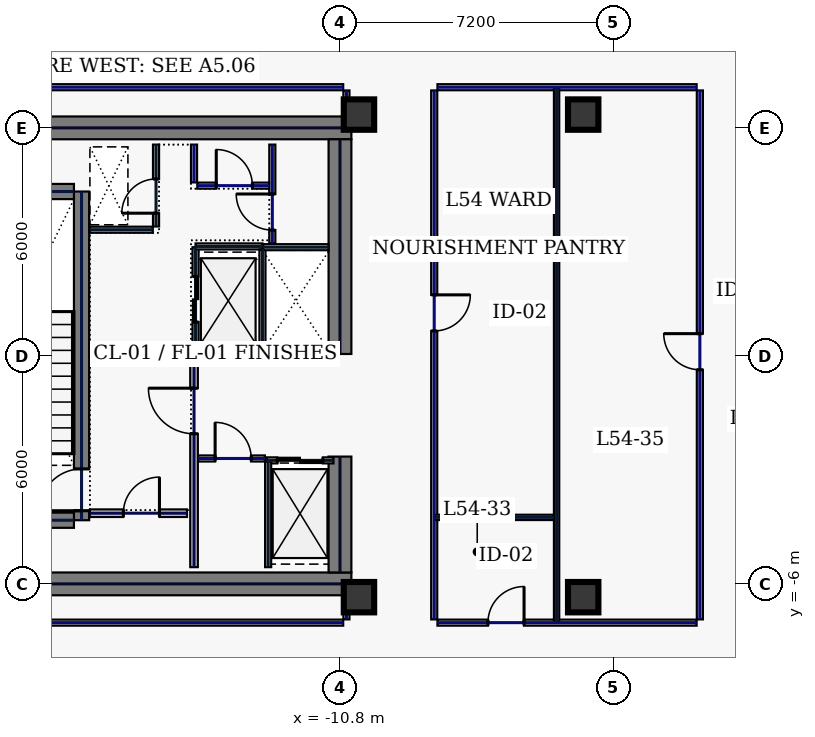
"""IFC4 building model, lengths in metres.
Left out: names, types, materials, properties, quantities, classifications, styles, units other than length and angle.
Written with IfcOpenShell. Run it as: python <this file> out.ifc"""

import sys

from ifc_helpers import new_model, si_unit, direction, frame, frame_2d, origin, origin_2d, place, context, subcontext, project, spatial, rectangle, hollow_rectangle, extrude, element, fill, save


model = new_model("IFC4")
c1 = context("Model", 3, precision=1e-05, world=origin(), true_north=direction((0.0, 1.0)))
c2 = subcontext(c1, "Body", "Model", "MODEL_VIEW")
j1 = project(units=[si_unit("LENGTHUNIT", "METRE"), si_unit("PLANEANGLEUNIT", "RADIAN")], contexts=[c1])
p1 = place(None, origin())
s1 = spatial("IfcSite", under=j1, at=p1, CompositionType="ELEMENT")
p2 = place(p1, origin())
s2 = spatial("IfcBuilding", under=s1, at=p2, CompositionType="ELEMENT")
p3 = place(p2, frame((0.0, 0.0, 234.2)))
s3 = spatial("IfcBuildingStorey", under=s2, at=p3, CompositionType="ELEMENT", Elevation=234.2)
for number, where, z_axis, x_axis in (
    (1, (-22.0, 6.0, 0.0), (0.0, 0.0, 1.0), (1.0, 0.0, 0.0)),
    (2, (-22.0, -6.0, 0.0), (0.0, 0.0, 1.0), (1.0, 0.0, 0.0)),
):
    element("IfcWall", number, at=place(p3, frame(where, z_axis=z_axis, x_axis=x_axis)), inside=s3, PredefinedType="SHEAR", context=c2, shape_type="SweptSolid", body=[
        extrude(rectangle(XDim=11.5, YDim=0.6, at=frame_2d((5.75, 0.0))), origin(), (0.0, 0.0, 1.0), 3.74),
    ])
p4 = place(p3, frame((-10.8, -5.7, 0.0), z_axis=(0.0, 0.0, 1.0), x_axis=(0.0, 1.0, 0.0)))
e3 = element("IfcWall", 3, at=p4, inside=s3, PredefinedType="SHEAR", context=c2, shape_type="SweptSolid", body=[
    extrude(rectangle(XDim=3.05, YDim=0.6, at=frame_2d((1.525, 0.0))), origin(), (0.0, 0.0, 1.0), 3.74),
])
p5 = place(p3, frame((-10.8, 0.05, 0.0), z_axis=(0.0, 0.0, 1.0), x_axis=(0.0, 1.0, 0.0)))
e4 = element("IfcWall", 4, at=p5, inside=s3, PredefinedType="SHEAR", context=c2, shape_type="SweptSolid", body=[
    extrude(rectangle(XDim=5.65, YDim=0.6, at=frame_2d((2.825, 0.0))), origin(), (0.0, 0.0, 1.0), 3.74),
])
p6 = place(p3, frame((-17.6, -4.325, 0.0), z_axis=(0.0, 0.0, 1.0), x_axis=(0.0, 1.0, 0.0)))
e5 = element("IfcWall", 5, at=p6, inside=s3, PredefinedType="SHEAR", context=c2, shape_type="SweptSolid", body=[
    extrude(rectangle(XDim=8.65, YDim=0.4, at=frame_2d((4.325, 0.0))), origin(), (0.0, 0.0, 1.0), 3.74),
])
p7 = place(p6, frame((0.25, 0.0, 0.0)))
e6 = element("IfcOpeningElement", 6, at=p7, cuts=e5, PredefinedType="OPENING", context=c2, shape_type="SweptSolid", body=[
    extrude(rectangle(XDim=1.1, YDim=2.2, at=frame_2d((0.55, 1.1))), frame((0.0, 0.21, 0.0), z_axis=(0.0, -1.0, 0.0), x_axis=(1.0, 0.0, 0.0)), (0.0, 0.0, 1.0), 0.42),
])
for number, where, z_axis, x_axis in (
    (7, (-21.2, -4.325, 0.0), (0.0, 0.0, 1.0), (1.0, 0.0, 0.0)),
    (8, (-21.2, 4.325, 0.0), (0.0, 0.0, 1.0), (1.0, 0.0, 0.0)),
):
    element("IfcWall", number, at=place(p3, frame(where, z_axis=z_axis, x_axis=x_axis)), inside=s3, PredefinedType="SHEAR", context=c2, shape_type="SweptSolid", body=[
        extrude(rectangle(XDim=3.4, YDim=0.4, at=frame_2d((1.7, 0.0))), origin(), (0.0, 0.0, 1.0), 3.74),
    ])
for number, where, z_axis, x_axis in (
    (9, (-10.3, -6.35, 0.0), (0.0, 0.0, 1.0), (1.0, 0.0, 0.0)),
    (10, (-10.3, 6.35, 0.0), (0.0, 0.0, 1.0), (1.0, 0.0, 0.0)),
    (11, (-4.4, -6.35, 0.0), (0.0, 0.0, 1.0), (1.0, 0.0, 0.0)),
    (12, (-4.4, 6.35, 0.0), (0.0, 0.0, 1.0), (1.0, 0.0, 0.0)),
):
    element("IfcColumn", number, at=place(p3, frame(where, z_axis=z_axis, x_axis=x_axis)), inside=s3, PredefinedType="COLUMN", context=c2, shape_type="SweptSolid", body=[
        extrude(hollow_rectangle(XDim=0.8, YDim=0.8, WallThickness=0.036, at=origin_2d()), origin(), (0.0, 0.0, 1.0), 3.74),
    ])
p8 = place(p3, frame((-14.6, 0.12, 0.0), z_axis=(0.0, 0.0, 1.0), x_axis=(0.0, 1.0, 0.0)))
e13 = element("IfcWall", 13, at=p8, inside=s3, PredefinedType="PARTITIONING", context=c2, shape_type="SweptSolid", body=[
    extrude(rectangle(XDim=2.74, YDim=0.16, at=frame_2d((1.37, 0.0))), origin(), (0.0, 0.0, 1.0), 3.74),
])
p9 = place(p8, frame((0.77, 0.0, 0.0)))
e14 = element("IfcOpeningElement", 14, at=p9, cuts=e13, PredefinedType="OPENING", context=c2, shape_type="SweptSolid", body=[
    extrude(rectangle(XDim=1.2, YDim=2.2, at=frame_2d((0.6, 1.1))), frame((0.0, 0.09, 0.0), z_axis=(0.0, -1.0, 0.0), x_axis=(1.0, 0.0, 0.0)), (0.0, 0.0, 1.0), 0.18),
])
for number, where, z_axis, x_axis in (
    (15, (-14.6, 0.1, 0.0), (0.0, 0.0, 1.0), (1.0, 0.0, 0.0)),
    (16, (-14.6, 2.88, 0.0), (0.0, 0.0, 1.0), (1.0, 0.0, 0.0)),
):
    element("IfcWall", number, at=place(p3, frame(where, z_axis=z_axis, x_axis=x_axis)), inside=s3, PredefinedType="PARTITIONING", context=c2, shape_type="SweptSolid", body=[
        extrude(rectangle(XDim=1.76, YDim=0.16, at=frame_2d((0.88, 0.0))), origin(), (0.0, 0.0, 1.0), 3.74),
    ])
p10 = place(p3, frame((-12.84, 0.18, 0.0), z_axis=(0.0, 0.0, 1.0), x_axis=(0.0, 1.0, 0.0)))
e17 = element("IfcWall", 17, at=p10, inside=s3, PredefinedType="PARTITIONING", context=c2, shape_type="SweptSolid", body=[
    extrude(rectangle(XDim=2.62, YDim=0.16, at=frame_2d((1.31, 0.0))), origin(), (0.0, 0.0, 1.0), 3.74),
])
p11 = place(p3, frame((-12.73, -2.75, 0.0), z_axis=(0.0, 0.0, 1.0), x_axis=(1.0, 0.0, 0.0)))
e18 = element("IfcWall", 18, at=p11, inside=s3, PredefinedType="PARTITIONING", context=c2, shape_type="SweptSolid", body=[
    extrude(rectangle(XDim=1.76, YDim=0.16, at=frame_2d((0.88, 0.0))), origin(), (0.0, 0.0, 1.0), 3.74),
])
p12 = place(p11, frame((0.28, 0.0, 0.0)))
e19 = element("IfcOpeningElement", 19, at=p12, cuts=e18, PredefinedType="OPENING", context=c2, shape_type="SweptSolid", body=[
    extrude(rectangle(XDim=1.2, YDim=2.2, at=frame_2d((0.6, 1.1))), frame((0.0, 0.09, 0.0), z_axis=(0.0, -1.0, 0.0), x_axis=(1.0, 0.0, 0.0)), (0.0, 0.0, 1.0), 0.18),
])
for number, where, z_axis, x_axis in (
    (20, (-12.82, 0.06, 0.0), (0.0, 0.0, 1.0), (1.0, 0.0, 0.0)),
    (21, (-12.82, 2.86, 0.0), (0.0, 0.0, 1.0), (1.0, 0.0, 0.0)),
):
    element("IfcWall", number, at=place(p3, frame(where, z_axis=z_axis, x_axis=x_axis)), inside=s3, PredefinedType="PARTITIONING", context=c2, shape_type="SweptSolid", body=[
        extrude(rectangle(XDim=1.72, YDim=0.16, at=frame_2d((0.86, 0.0))), origin(), (0.0, 0.0, 1.0), 3.74),
    ])
p13 = place(p3, frame((-15.64, 3.405, 0.0), z_axis=(0.0, 0.0, 1.0), x_axis=(0.0, 1.0, 0.0)))
e22 = element("IfcWall", 22, at=p13, inside=s3, PredefinedType="PARTITIONING", context=c2, shape_type="SweptSolid", body=[
    extrude(rectangle(XDim=2.155, YDim=0.16, at=frame_2d((1.078, 0.0))), origin(), (0.0, 0.0, 1.0), 3.74),
])
p14 = place(p13, frame((0.35, 0.0, 0.0)))
e23 = element("IfcOpeningElement", 23, at=p14, cuts=e22, PredefinedType="OPENING", context=c2, shape_type="SweptSolid", body=[
    extrude(rectangle(XDim=0.9, YDim=2.2, at=frame_2d((0.45, 1.1))), frame((0.0, 0.09, 0.0), z_axis=(0.0, -1.0, 0.0), x_axis=(1.0, 0.0, 0.0)), (0.0, 0.0, 1.0), 0.18),
])
p15 = place(p3, frame((-17.38, 3.32, 0.0), z_axis=(0.0, 0.0, 1.0), x_axis=(1.0, 0.0, 0.0)))
e24 = element("IfcWall", 24, at=p15, inside=s3, PredefinedType="PARTITIONING", context=c2, shape_type="SweptSolid", body=[
    extrude(rectangle(XDim=1.655, YDim=0.16, at=frame_2d((0.827, 0.0))), origin(), (0.0, 0.0, 1.0), 3.74),
])
p16 = place(p3, frame((-17.38, -4.14, 0.0), z_axis=(0.0, 0.0, 1.0), x_axis=(1.0, 0.0, 0.0)))
e25 = element("IfcWall", 25, at=p16, inside=s3, PredefinedType="SOLIDWALL", context=c2, shape_type="SweptSolid", body=[
    extrude(rectangle(XDim=2.555, YDim=0.2, at=frame_2d((1.277, 0.0))), origin(), (0.0, 0.0, 1.0), 3.74),
])
p17 = place(p16, frame((0.88, 0.0, 0.0)))
e26 = element("IfcOpeningElement", 26, at=p17, cuts=e25, PredefinedType="OPENING", context=c2, shape_type="SweptSolid", body=[
    extrude(rectangle(XDim=0.95, YDim=2.2, at=frame_2d((0.475, 1.1))), frame((0.0, 0.11, 0.0), z_axis=(0.0, -1.0, 0.0), x_axis=(1.0, 0.0, 0.0)), (0.0, 0.0, 1.0), 0.22),
])
p18 = place(p3, frame((-14.535, -2.7, 0.0), z_axis=(0.0, 0.0, 1.0), x_axis=(1.0, 0.0, 0.0)))
e27 = element("IfcWall", 27, at=p18, inside=s3, PredefinedType="PARTITIONING", context=c2, shape_type="SweptSolid", body=[
    extrude(rectangle(XDim=1.76, YDim=0.16, at=frame_2d((0.88, 0.0))), origin(), (0.0, 0.0, 1.0), 3.74),
])
p19 = place(p18, frame((0.45, 0.0, 0.0)))
e28 = element("IfcOpeningElement", 28, at=p19, cuts=e27, PredefinedType="OPENING", context=c2, shape_type="SweptSolid", body=[
    extrude(rectangle(XDim=0.95, YDim=2.2, at=frame_2d((0.475, 1.1))), frame((0.0, 0.09, 0.0), z_axis=(0.0, -1.0, 0.0), x_axis=(1.0, 0.0, 0.0)), (0.0, 0.0, 1.0), 0.18),
])
p20 = place(p3, frame((-12.69, -5.56, 0.0), z_axis=(0.0, 0.0, 1.0), x_axis=(0.0, 1.0, 0.0)))
e29 = element("IfcWall", 29, at=p20, inside=s3, PredefinedType="PARTITIONING", context=c2, shape_type="SweptSolid", body=[
    extrude(rectangle(XDim=2.775, YDim=0.16, at=frame_2d((1.388, 0.0))), origin(), (0.0, 0.0, 1.0), 3.74),
])
p21 = place(p3, frame((-12.58, 2.96, 0.0), z_axis=(0.0, 0.0, 1.0), x_axis=(0.0, 1.0, 0.0)))
e30 = element("IfcWall", 30, at=p21, inside=s3, PredefinedType="PARTITIONING", context=c2, shape_type="SweptSolid", body=[
    extrude(rectangle(XDim=2.6, YDim=0.16, at=frame_2d((1.3, 0.0))), origin(), (0.0, 0.0, 1.0), 3.74),
])
p22 = place(p21, frame((0.35, 0.0, 0.0)))
e31 = element("IfcOpeningElement", 31, at=p22, cuts=e30, PredefinedType="OPENING", context=c2, shape_type="SweptSolid", body=[
    extrude(rectangle(XDim=0.95, YDim=2.2, at=frame_2d((0.475, 1.1))), frame((0.0, 0.09, 0.0), z_axis=(0.0, -1.0, 0.0), x_axis=(1.0, 0.0, 0.0)), (0.0, 0.0, 1.0), 0.18),
])
p23 = place(p3, frame((-14.555, 4.48, 0.0), z_axis=(0.0, 0.0, 1.0), x_axis=(1.0, 0.0, 0.0)))
e32 = element("IfcWall", 32, at=p23, inside=s3, PredefinedType="PARTITIONING", context=c2, shape_type="SweptSolid", body=[
    extrude(rectangle(XDim=1.89, YDim=0.16, at=frame_2d((0.945, 0.0))), origin(), (0.0, 0.0, 1.0), 3.74),
])
p24 = place(p23, frame((0.5, 0.0, 0.0)))
e33 = element("IfcOpeningElement", 33, at=p24, cuts=e32, PredefinedType="OPENING", context=c2, shape_type="SweptSolid", body=[
    extrude(rectangle(XDim=0.95, YDim=2.2, at=frame_2d((0.475, 1.1))), frame((0.0, 0.09, 0.0), z_axis=(0.0, -1.0, 0.0), x_axis=(1.0, 0.0, 0.0)), (0.0, 0.0, 1.0), 0.18),
])
p25 = place(p3, frame((-14.64, 4.565, 0.0), z_axis=(0.0, 0.0, 1.0), x_axis=(0.0, 1.0, 0.0)))
e34 = element("IfcWall", 34, at=p25, inside=s3, PredefinedType="PARTITIONING", context=c2, shape_type="SweptSolid", body=[
    extrude(rectangle(XDim=0.995, YDim=0.16, at=frame_2d((0.498, 0.0))), origin(), (0.0, 0.0, 1.0), 3.74),
])
p26 = place(p3, frame((-14.64, -5.56, 0.0), z_axis=(0.0, 0.0, 1.0), x_axis=(0.0, 1.0, 0.0)))
e35 = element("IfcWall", 35, at=p26, inside=s3, PredefinedType="SOLIDWALL", context=c2, shape_type="SweptSolid", body=[
    extrude(rectangle(XDim=5.6, YDim=0.2, at=frame_2d((2.8, 0.0))), origin(), (0.0, 0.0, 1.0), 3.74),
])
p27 = place(p26, frame((3.51, 0.0, 0.0)))
e36 = element("IfcOpeningElement", 36, at=p27, cuts=e35, PredefinedType="OPENING", context=c2, shape_type="SweptSolid", body=[
    extrude(rectangle(XDim=1.2, YDim=2.2, at=frame_2d((0.6, 1.1))), frame((0.0, 0.11, 0.0), z_axis=(0.0, -1.0, 0.0), x_axis=(1.0, 0.0, 0.0)), (0.0, 0.0, 1.0), 0.22),
])
p28 = place(p3, frame((-24.815, -7.02, 0.0), z_axis=(0.0, 0.0, 1.0), x_axis=(1.0, 0.0, 0.0)))
e37 = element("IfcWall", 37, at=p28, inside=s3, PredefinedType="PARTITIONING", context=c2, shape_type="SweptSolid", body=[
    extrude(rectangle(XDim=14.1, YDim=0.16, at=frame_2d((7.05, 0.0))), origin(), (0.0, 0.0, 1.0), 3.74),
])
p29 = place(p3, frame((-10.63, -6.935, 0.0), z_axis=(0.0, 0.0, 1.0), x_axis=(0.0, 1.0, 0.0)))
e38 = element("IfcWall", 38, at=p29, inside=s3, PredefinedType="PARTITIONING", context=c2, shape_type="SweptSolid", body=[
    extrude(rectangle(XDim=0.515, YDim=0.16, at=frame_2d((0.258, 0.0))), origin(), (0.0, 0.0, 1.0), 3.74),
])
p30 = place(p3, frame((-10.63, 6.42, 0.0), z_axis=(0.0, 0.0, 1.0), x_axis=(0.0, 1.0, 0.0)))
e39 = element("IfcWall", 39, at=p30, inside=s3, PredefinedType="PARTITIONING", context=c2, shape_type="SweptSolid", body=[
    extrude(rectangle(XDim=0.565, YDim=0.16, at=frame_2d((0.283, 0.0))), origin(), (0.0, 0.0, 1.0), 3.74),
])
p31 = place(p3, frame((-10.715, 7.07, 0.0), z_axis=(0.0, 0.0, 1.0), x_axis=(-1.0, 0.0, 0.0)))
e40 = element("IfcWall", 40, at=p31, inside=s3, PredefinedType="PARTITIONING", context=c2, shape_type="SweptSolid", body=[
    extrude(rectangle(XDim=14.1, YDim=0.16, at=frame_2d((7.05, 0.0))), origin(), (0.0, 0.0, 1.0), 3.74),
])
p32 = place(p3, frame((-1.33, -6.935, 0.0), z_axis=(0.0, 0.0, 1.0), x_axis=(0.0, 1.0, 0.0)))
e41 = element("IfcWall", 41, at=p32, inside=s3, PredefinedType="PARTITIONING", context=c2, shape_type="SweptSolid", body=[
    extrude(rectangle(XDim=13.92, YDim=0.16, at=frame_2d((6.96, 0.0))), origin(), (0.0, 0.0, 1.0), 3.74),
])
p33 = place(p32, frame((6.57, 0.0, 0.0)))
e42 = element("IfcOpeningElement", 42, at=p33, cuts=e41, PredefinedType="OPENING", context=c2, shape_type="SweptSolid", body=[
    extrude(rectangle(XDim=0.95, YDim=2.2, at=frame_2d((0.475, 1.1))), frame((0.0, 0.09, 0.0), z_axis=(0.0, -1.0, 0.0), x_axis=(1.0, 0.0, 0.0)), (0.0, 0.0, 1.0), 0.18),
])
p34 = place(p3, frame((-1.415, 7.07, 0.0), z_axis=(0.0, 0.0, 1.0), x_axis=(-1.0, 0.0, 0.0)))
e43 = element("IfcWall", 43, at=p34, inside=s3, PredefinedType="PARTITIONING", context=c2, shape_type="SweptSolid", body=[
    extrude(rectangle(XDim=6.82, YDim=0.16, at=frame_2d((3.41, 0.0))), origin(), (0.0, 0.0, 1.0), 3.74),
])
p35 = place(p3, frame((-8.32, 6.985, 0.0), z_axis=(0.0, 0.0, 1.0), x_axis=(0.0, -1.0, 0.0)))
e44 = element("IfcWall", 44, at=p35, inside=s3, PredefinedType="PARTITIONING", context=c2, shape_type="SweptSolid", body=[
    extrude(rectangle(XDim=13.92, YDim=0.16, at=frame_2d((6.96, 0.0))), origin(), (0.0, 0.0, 1.0), 3.74),
])
p36 = place(p35, frame((5.379, 0.0, 0.0)))
e45 = element("IfcOpeningElement", 45, at=p36, cuts=e44, PredefinedType="OPENING", context=c2, shape_type="SweptSolid", body=[
    extrude(rectangle(XDim=0.95, YDim=2.2, at=frame_2d((0.475, 1.1))), frame((0.0, 0.09, 0.0), z_axis=(0.0, -1.0, 0.0), x_axis=(1.0, 0.0, 0.0)), (0.0, 0.0, 1.0), 0.18),
])
p37 = place(p3, frame((-8.235, -7.02, 0.0), z_axis=(0.0, 0.0, 1.0), x_axis=(1.0, 0.0, 0.0)))
e46 = element("IfcWall", 46, at=p37, inside=s3, PredefinedType="PARTITIONING", context=c2, shape_type="SweptSolid", body=[
    extrude(rectangle(XDim=6.82, YDim=0.16, at=frame_2d((3.41, 0.0))), origin(), (0.0, 0.0, 1.0), 3.74),
])
p38 = place(p37, frame((1.329, 0.0, 0.0)))
e47 = element("IfcOpeningElement", 47, at=p38, cuts=e46, PredefinedType="OPENING", context=c2, shape_type="SweptSolid", body=[
    extrude(rectangle(XDim=0.95, YDim=2.2, at=frame_2d((0.475, 1.1))), frame((0.0, 0.09, 0.0), z_axis=(0.0, -1.0, 0.0), x_axis=(1.0, 0.0, 0.0)), (0.0, 0.0, 1.0), 0.18),
])
p39 = place(p3, frame((-5.1, -7.015, 0.0), z_axis=(0.0, 0.0, 1.0), x_axis=(0.0, 1.0, 0.0)))
e48 = element("IfcWall", 48, at=p39, inside=s3, PredefinedType="PARTITIONING", context=c2, shape_type="SweptSolid", body=[
    extrude(rectangle(XDim=14.08, YDim=0.14, at=frame_2d((7.04, 0.0))), origin(), (0.0, 0.0, 1.0), 3.74),
])
p40 = place(p3, frame((-8.315, -4.25, 0.0), z_axis=(0.0, 0.0, 1.0), x_axis=(1.0, 0.0, 0.0)))
e49 = element("IfcWall", 49, at=p40, inside=s3, PredefinedType="PARTITIONING", context=c2, shape_type="SweptSolid", body=[
    extrude(rectangle(XDim=3.14, YDim=0.14, at=frame_2d((1.57, 0.0))), origin(), (0.0, 0.0, 1.0), 3.74),
])
p41 = place(p7, origin())
e50 = element("IfcDoor", 50, at=p41, inside=s3, OperationType="SINGLE_SWING_LEFT", PredefinedType="DOOR", context=c2, shape_type="SweptSolid", body=[
    extrude(rectangle(XDim=1.1, YDim=2.2, at=frame_2d((0.55, 1.1))), frame((0.0, 0.025, 0.0), z_axis=(0.0, -1.0, 0.0), x_axis=(1.0, 0.0, 0.0)), (0.0, 0.0, 1.0), 0.05),
])
fill(e6, e50)
p42 = place(p9, origin())
e51 = element("IfcDoor", 51, at=p42, inside=s3, OperationType="SLIDING_TO_LEFT", PredefinedType="DOOR", context=c2, shape_type="SweptSolid", body=[
    extrude(rectangle(XDim=1.2, YDim=2.2, at=frame_2d((0.6, 1.1))), frame((0.0, 0.025, 0.0), z_axis=(0.0, -1.0, 0.0), x_axis=(1.0, 0.0, 0.0)), (0.0, 0.0, 1.0), 0.05),
])
fill(e14, e51)
p43 = place(p12, origin())
e52 = element("IfcDoor", 52, at=p43, inside=s3, OperationType="SLIDING_TO_LEFT", PredefinedType="DOOR", context=c2, shape_type="SweptSolid", body=[
    extrude(rectangle(XDim=1.2, YDim=2.2, at=frame_2d((0.6, 1.1))), frame((0.0, 0.025, 0.0), z_axis=(0.0, -1.0, 0.0), x_axis=(1.0, 0.0, 0.0)), (0.0, 0.0, 1.0), 0.05),
])
fill(e19, e52)
p44 = place(p14, origin())
e53 = element("IfcDoor", 53, at=p44, inside=s3, OperationType="SINGLE_SWING_LEFT", PredefinedType="DOOR", context=c2, shape_type="SweptSolid", body=[
    extrude(rectangle(XDim=0.9, YDim=2.2, at=frame_2d((0.45, 1.1))), frame((0.0, 0.025, 0.0), z_axis=(0.0, -1.0, 0.0), x_axis=(1.0, 0.0, 0.0)), (0.0, 0.0, 1.0), 0.05),
])
fill(e23, e53)
p45 = place(p17, origin())
e54 = element("IfcDoor", 54, at=p45, inside=s3, OperationType="SINGLE_SWING_RIGHT", PredefinedType="DOOR", context=c2, shape_type="SweptSolid", body=[
    extrude(rectangle(XDim=0.95, YDim=2.2, at=frame_2d((0.475, 1.1))), frame((0.0, 0.025, 0.0), z_axis=(0.0, -1.0, 0.0), x_axis=(1.0, 0.0, 0.0)), (0.0, 0.0, 1.0), 0.05),
])
fill(e26, e54)
p46 = place(p19, origin())
e55 = element("IfcDoor", 55, at=p46, inside=s3, OperationType="SINGLE_SWING_LEFT", PredefinedType="DOOR", context=c2, shape_type="SweptSolid", body=[
    extrude(rectangle(XDim=0.95, YDim=2.2, at=frame_2d((0.475, 1.1))), frame((0.0, 0.025, 0.0), z_axis=(0.0, -1.0, 0.0), x_axis=(1.0, 0.0, 0.0)), (0.0, 0.0, 1.0), 0.05),
])
fill(e28, e55)
p47 = place(p22, origin())
e56 = element("IfcDoor", 56, at=p47, inside=s3, OperationType="SINGLE_SWING_RIGHT", PredefinedType="DOOR", context=c2, shape_type="SweptSolid", body=[
    extrude(rectangle(XDim=0.95, YDim=2.2, at=frame_2d((0.475, 1.1))), frame((0.0, 0.025, 0.0), z_axis=(0.0, -1.0, 0.0), x_axis=(1.0, 0.0, 0.0)), (0.0, 0.0, 1.0), 0.05),
])
fill(e31, e56)
p48 = place(p24, origin())
e57 = element("IfcDoor", 57, at=p48, inside=s3, OperationType="SINGLE_SWING_LEFT", PredefinedType="DOOR", context=c2, shape_type="SweptSolid", body=[
    extrude(rectangle(XDim=0.95, YDim=2.2, at=frame_2d((0.475, 1.1))), frame((0.0, 0.025, 0.0), z_axis=(0.0, -1.0, 0.0), x_axis=(1.0, 0.0, 0.0)), (0.0, 0.0, 1.0), 0.05),
])
fill(e33, e57)
p49 = place(p27, origin())
e58 = element("IfcDoor", 58, at=p49, inside=s3, OperationType="SINGLE_SWING_RIGHT", PredefinedType="DOOR", context=c2, shape_type="SweptSolid", body=[
    extrude(rectangle(XDim=1.2, YDim=2.2, at=frame_2d((0.6, 1.1))), frame((0.0, 0.025, 0.0), z_axis=(0.0, -1.0, 0.0), x_axis=(1.0, 0.0, 0.0)), (0.0, 0.0, 1.0), 0.05),
])
fill(e36, e58)
p50 = place(p38, origin())
e59 = element("IfcDoor", 59, at=p50, inside=s3, OperationType="SINGLE_SWING_RIGHT", PredefinedType="DOOR", context=c2, shape_type="SweptSolid", body=[
    extrude(rectangle(XDim=0.95, YDim=2.2, at=frame_2d((0.475, 1.1))), frame((0.0, 0.025, 0.0), z_axis=(0.0, -1.0, 0.0), x_axis=(1.0, 0.0, 0.0)), (0.0, 0.0, 1.0), 0.05),
])
fill(e47, e59)
p51 = place(p36, origin())
e60 = element("IfcDoor", 60, at=p51, inside=s3, OperationType="SINGLE_SWING_LEFT", PredefinedType="DOOR", context=c2, shape_type="SweptSolid", body=[
    extrude(rectangle(XDim=0.95, YDim=2.2, at=frame_2d((0.475, 1.1))), frame((0.0, 0.025, 0.0), z_axis=(0.0, -1.0, 0.0), x_axis=(1.0, 0.0, 0.0)), (0.0, 0.0, 1.0), 0.05),
])
fill(e45, e60)
p52 = place(p33, origin())
e61 = element("IfcDoor", 61, at=p52, inside=s3, OperationType="SINGLE_SWING_RIGHT", PredefinedType="DOOR", context=c2, shape_type="SweptSolid", body=[
    extrude(rectangle(XDim=0.95, YDim=2.2, at=frame_2d((0.475, 1.1))), frame((0.0, 0.025, 0.0), z_axis=(0.0, -1.0, 0.0), x_axis=(1.0, 0.0, 0.0)), (0.0, 0.0, 1.0), 0.05),
])
fill(e42, e61)
save(model, sys.argv[1])
